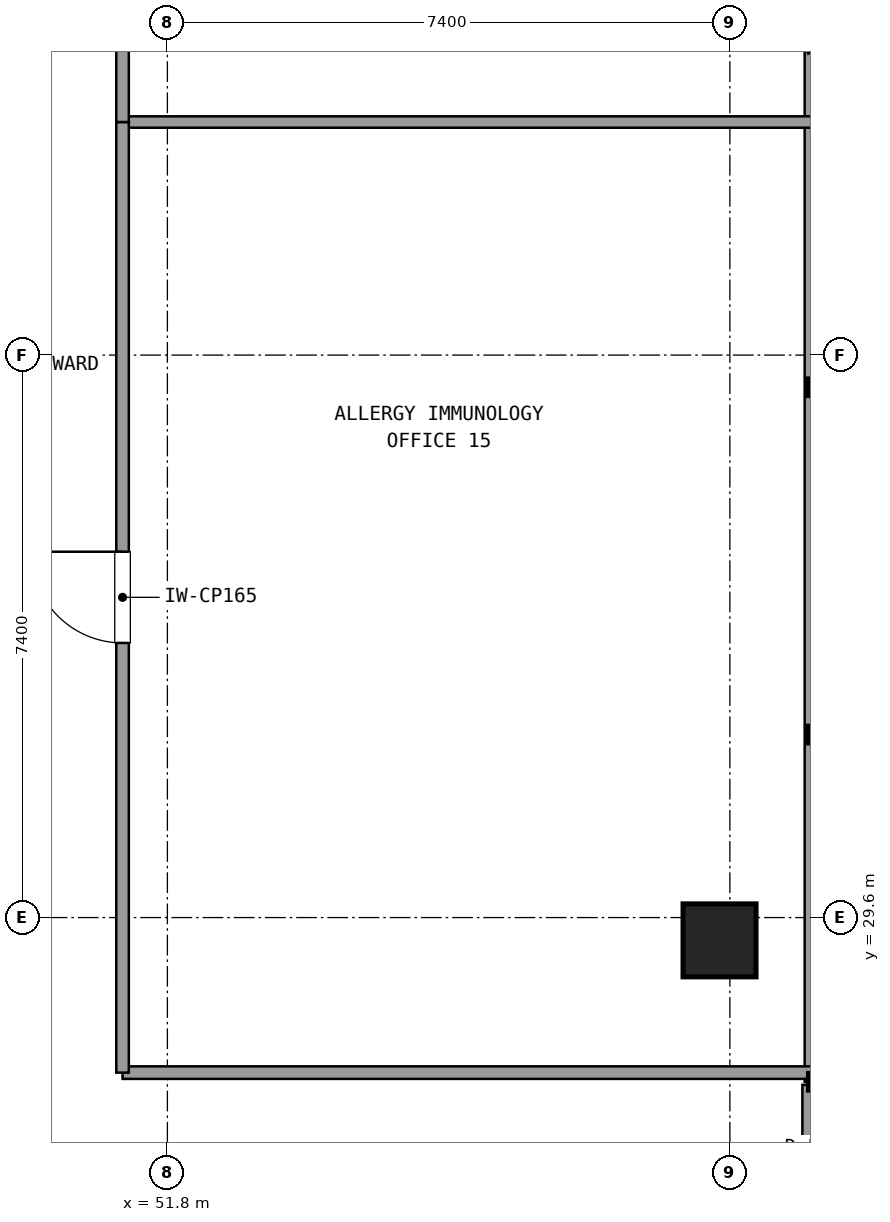
"""IFC4 building model, lengths in metres.
Left out: names, types, materials, properties, quantities, classifications, styles, units other than length and angle.
Written with IfcOpenShell. Run it as: python <this file> out.ifc"""

import sys

from ifc_helpers import new_model, si_unit, direction, frame, frame_2d, origin, origin_2d, place, context, subcontext, project, spatial, rectangle, extrude, element, fill, save


model = new_model("IFC4")
c1 = context("Model", 3, precision=1e-05, world=origin(), true_north=direction((0.0, 1.0)))
c2 = subcontext(c1, "Body", "Model", "MODEL_VIEW")
j1 = project(units=[si_unit("LENGTHUNIT", "METRE"), si_unit("PLANEANGLEUNIT", "RADIAN")], contexts=[c1])
p1 = place(None, origin())
s1 = spatial("IfcSite", under=j1, at=p1, CompositionType="ELEMENT")
p2 = place(p1, origin())
s2 = spatial("IfcBuilding", under=s1, at=p2, CompositionType="ELEMENT")
p3 = place(p2, frame((0.0, 0.0, 145.62)))
s3 = spatial("IfcBuildingStorey", under=s2, at=p3, CompositionType="ELEMENT", Elevation=145.62)
p4 = place(p3, frame((59.064, 29.3, 0.0), z_axis=(0.0, 0.0, 1.0), x_axis=(1.0, 0.0, 0.0)))
e1 = element("IfcColumn", 1, at=p4, inside=s3, PredefinedType="COLUMN", context=c2, shape_type="SweptSolid", body=[
    extrude(rectangle(XDim=0.96, YDim=0.96, at=origin_2d()), origin(), (0.0, 0.0, 1.0), 3.6),
])
p5 = place(p3, frame((60.304, 24.4, 0.0), z_axis=(0.0, 0.0, 1.0), x_axis=(0.0, 1.0, 0.0)))
e2 = element("IfcWall", 2, at=p5, inside=s3, PredefinedType="SOLIDWALL", context=c2, shape_type="SweptSolid", body=[
    extrude(rectangle(XDim=3.0, YDim=0.3, at=frame_2d((1.5, 0.0))), origin(), (0.0, 0.0, 1.0), 2.67),
])
p6 = place(p5, frame((0.9, 0.0, 0.0)))
e3 = element("IfcOpeningElement", 3, at=p6, cuts=e2, PredefinedType="OPENING", context=c2, shape_type="SweptSolid", body=[
    extrude(rectangle(XDim=1.2, YDim=2.2, at=frame_2d((0.6, 1.1))), frame((0.0, 0.16, 0.0), z_axis=(0.0, -1.0, 0.0), x_axis=(1.0, 0.0, 0.0)), (0.0, 0.0, 1.0), 0.32),
])
p7 = place(p3, frame((60.304, 27.44, 0.0), z_axis=(0.0, 0.0, 1.0), x_axis=(0.0, 1.0, 0.0)))
e4 = element("IfcWall", 4, at=p7, inside=s3, PredefinedType="SOLIDWALL", context=c2, shape_type="SweptSolid", body=[
    extrude(rectangle(XDim=13.705, YDim=0.24, at=frame_2d((6.853, 0.0))), origin(), (0.0, 0.0, 1.0), 0.85),
])
p8 = place(p3, frame((51.21, 27.56, 0.0), z_axis=(0.0, 0.0, 1.0), x_axis=(1.0, 0.0, 0.0)))
e5 = element("IfcWall", 5, at=p8, inside=s3, PredefinedType="PARTITIONING", context=c2, shape_type="SweptSolid", body=[
    extrude(rectangle(XDim=9.074, YDim=0.165, at=frame_2d((4.537, 0.0))), origin(), (0.0, 0.0, 1.0), 2.61),
])
p9 = place(p3, frame((51.21, 40.066, 0.0), z_axis=(0.0, 0.0, 1.0), x_axis=(1.0, 0.0, 0.0)))
e6 = element("IfcWall", 6, at=p9, inside=s3, PredefinedType="PARTITIONING", context=c2, shape_type="SweptSolid", body=[
    extrude(rectangle(XDim=9.074, YDim=0.15, at=frame_2d((4.537, 0.0))), origin(), (0.0, 0.0, 1.0), 2.61),
])
p10 = place(p3, frame((51.21, 27.56, 0.0), z_axis=(0.0, 0.0, 1.0), x_axis=(0.0, 1.0, 0.0)))
e7 = element("IfcWall", 7, at=p10, inside=s3, PredefinedType="PARTITIONING", context=c2, shape_type="SweptSolid", body=[
    extrude(rectangle(XDim=12.506, YDim=0.165, at=frame_2d((6.253, 0.0))), origin(), (0.0, 0.0, 1.0), 2.61),
])
p11 = place(p10, frame((5.653, 0.0, 0.0)))
e8 = element("IfcOpeningElement", 8, at=p11, cuts=e7, PredefinedType="OPENING", context=c2, shape_type="SweptSolid", body=[
    extrude(rectangle(XDim=1.2, YDim=2.15, at=frame_2d((0.6, 1.075))), frame((0.0, 0.093, 0.0), z_axis=(0.0, -1.0, 0.0), x_axis=(1.0, 0.0, 0.0)), (0.0, 0.0, 1.0), 0.185),
])
p12 = place(p3, frame((51.21, 40.066, 0.0), z_axis=(0.0, 0.0, 1.0), x_axis=(0.0, 1.0, 0.0)))
e9 = element("IfcWall", 9, at=p12, inside=s3, PredefinedType="PARTITIONING", context=c2, shape_type="SweptSolid", body=[
    extrude(rectangle(XDim=7.034, YDim=0.165, at=frame_2d((3.517, 0.0))), origin(), (0.0, 0.0, 1.0), 2.61),
])
p13 = place(p12, frame((2.917, 0.0, 0.0)))
e10 = element("IfcOpeningElement", 10, at=p13, cuts=e9, PredefinedType="OPENING", context=c2, shape_type="SweptSolid", body=[
    extrude(rectangle(XDim=1.2, YDim=2.15, at=frame_2d((0.6, 1.075))), frame((0.0, 0.093, 0.0), z_axis=(0.0, -1.0, 0.0), x_axis=(1.0, 0.0, 0.0)), (0.0, 0.0, 1.0), 0.185),
])
p14 = place(p11, origin())
e11 = element("IfcDoor", 11, at=p14, inside=s3, OperationType="SINGLE_SWING_RIGHT", PredefinedType="DOOR", context=c2, shape_type="SweptSolid", body=[
    extrude(rectangle(XDim=1.2, YDim=2.15, at=frame_2d((0.6, 1.075))), frame((0.0, 0.025, 0.0), z_axis=(0.0, -1.0, 0.0), x_axis=(1.0, 0.0, 0.0)), (0.0, 0.0, 1.0), 0.05),
])
fill(e8, e11)
save(model, sys.argv[1])
